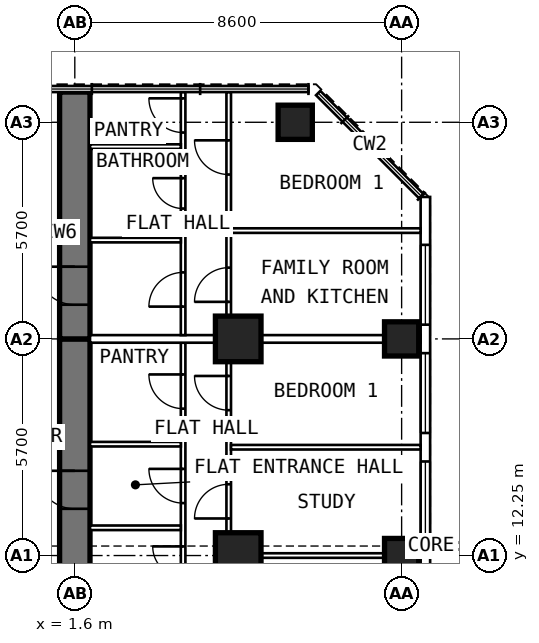
"""IFC4 building model, lengths in metres.
Left out: names, types, materials, properties, quantities, classifications, styles, units other than length and angle.
Written with IfcOpenShell. Run it as: python <this file> out.ifc"""

import sys

from ifc_helpers import new_model, si_unit, direction, frame, frame_2d, origin, origin_2d, place, context, subcontext, project, spatial, rectangle, extrude, element, fill, save


model = new_model("IFC4")
c1 = context("Model", 3, precision=1e-05, world=origin(), true_north=direction((0.0, 1.0)))
c2 = subcontext(c1, "Body", "Model", "MODEL_VIEW")
j1 = project(units=[si_unit("LENGTHUNIT", "METRE"), si_unit("PLANEANGLEUNIT", "RADIAN")], contexts=[c1])
p1 = place(None, origin())
s1 = spatial("IfcSite", under=j1, at=p1, CompositionType="ELEMENT")
p2 = place(p1, origin())
s2 = spatial("IfcBuilding", under=s1, at=p2, CompositionType="ELEMENT")
p3 = place(p2, frame((0.0, 0.0, 179.6)))
s3 = spatial("IfcBuildingStorey", under=s2, at=p3, CompositionType="ELEMENT", Elevation=179.6)
for number, where, z_axis, x_axis in (
    (1, (10.2, 12.25, 0.0), (0.0, 0.0, 1.0), (0.0, 1.0, 0.0)),
    (2, (10.2, 17.95, 0.0), (0.0, 0.0, 1.0), (0.0, 1.0, 0.0)),
    (3, (7.4, 23.65, 0.0), (0.0, 0.0, 1.0), (0.0, 1.0, 0.0)),
):
    element("IfcColumn", number, at=place(p3, frame(where, z_axis=z_axis, x_axis=x_axis)), inside=s3, PredefinedType="COLUMN", context=c2, shape_type="SweptSolid", body=[
        extrude(rectangle(XDim=0.9, YDim=0.9, at=origin_2d()), origin(), (0.0, 0.0, 1.0), 3.6),
    ])
for number, where, z_axis, x_axis in (
    (4, (5.9, 12.25, 0.0), (0.0, 0.0, 1.0), (0.0, 1.0, 0.0)),
    (5, (5.9, 17.95, 0.0), (0.0, 0.0, 1.0), (0.0, 1.0, 0.0)),
):
    element("IfcColumn", number, at=place(p3, frame(where, z_axis=z_axis, x_axis=x_axis)), inside=s3, PredefinedType="COLUMN", context=c2, shape_type="SweptSolid", body=[
        extrude(rectangle(XDim=1.2, YDim=1.2, at=origin_2d()), origin(), (0.0, 0.0, 1.0), 3.6),
    ])
p4 = place(p3, frame((1.6, 9.6, 0.0), z_axis=(0.0, 0.0, 1.0), x_axis=(0.0, 1.0, 0.0)))
e6 = element("IfcWall", 6, at=p4, inside=s3, PredefinedType="SHEAR", context=c2, shape_type="SweptSolid", body=[
    extrude(rectangle(XDim=8.35, YDim=0.8, at=frame_2d((4.175, 0.0))), origin(), (0.0, 0.0, 1.0), 3.6),
])
p5 = place(p4, frame((3.88, 0.0, 0.0)))
e7 = element("IfcOpeningElement", 7, at=p5, cuts=e6, PredefinedType="OPENING", context=c2, shape_type="SweptSolid", body=[
    extrude(rectangle(XDim=1.0, YDim=2.1, at=frame_2d((0.5, 1.05))), frame((0.0, 0.412, 0.0), z_axis=(0.0, -1.0, 0.0), x_axis=(1.0, 0.0, 0.0)), (0.0, 0.0, 1.0), 0.824),
])
p6 = place(p3, frame((1.6, 17.95, 0.0), z_axis=(0.0, 0.0, 1.0), x_axis=(0.0, 1.0, 0.0)))
e8 = element("IfcWall", 8, at=p6, inside=s3, PredefinedType="SHEAR", context=c2, shape_type="SweptSolid", body=[
    extrude(rectangle(XDim=6.495, YDim=0.8, at=frame_2d((3.248, 0.0))), origin(), (0.0, 0.0, 1.0), 3.6),
])
p7 = place(p6, frame((0.9, 0.0, 0.0)))
e9 = element("IfcOpeningElement", 9, at=p7, cuts=e8, PredefinedType="OPENING", context=c2, shape_type="SweptSolid", body=[
    extrude(rectangle(XDim=1.0, YDim=2.1, at=frame_2d((0.5, 1.05))), frame((0.0, 0.412, 0.0), z_axis=(0.0, -1.0, 0.0), x_axis=(1.0, 0.0, 0.0)), (0.0, 0.0, 1.0), 0.824),
])
p8 = place(p3, frame((10.825, 6.409, 0.0), z_axis=(0.0, 0.0, 1.0), x_axis=(0.0, 1.0, 0.0)))
e10 = element("IfcWall", 10, at=p8, inside=s3, PredefinedType="SOLIDWALL", context=c2, shape_type="SweptSolid", body=[
    extrude(rectangle(XDim=15.276, YDim=0.25, at=frame_2d((7.638, 0.0))), origin(), (0.0, 0.0, 1.0), 3.35),
])
p9 = place(p8, frame((0.516, 0.0, 0.8)))
e11 = element("IfcOpeningElement", 11, at=p9, cuts=e10, PredefinedType="OPENING", context=c2, shape_type="SweptSolid", body=[
    extrude(rectangle(XDim=2.1, YDim=1.8, at=frame_2d((1.05, 0.9))), frame((0.0, 0.137, 0.0), z_axis=(0.0, -1.0, 0.0), x_axis=(1.0, 0.0, 0.0)), (0.0, 0.0, 1.0), 0.274),
])
p10 = place(p8, frame((3.366, 0.0, 0.8)))
e12 = element("IfcOpeningElement", 12, at=p10, cuts=e10, PredefinedType="OPENING", context=c2, shape_type="SweptSolid", body=[
    extrude(rectangle(XDim=2.1, YDim=1.8, at=frame_2d((1.05, 0.9))), frame((0.0, 0.137, 0.0), z_axis=(0.0, -1.0, 0.0), x_axis=(1.0, 0.0, 0.0)), (0.0, 0.0, 1.0), 0.274),
])
p11 = place(p8, frame((6.216, 0.0, 0.8)))
e13 = element("IfcOpeningElement", 13, at=p11, cuts=e10, PredefinedType="OPENING", context=c2, shape_type="SweptSolid", body=[
    extrude(rectangle(XDim=2.1, YDim=1.8, at=frame_2d((1.05, 0.9))), frame((0.0, 0.137, 0.0), z_axis=(0.0, -1.0, 0.0), x_axis=(1.0, 0.0, 0.0)), (0.0, 0.0, 1.0), 0.274),
])
p12 = place(p8, frame((9.066, 0.0, 0.8)))
e14 = element("IfcOpeningElement", 14, at=p12, cuts=e10, PredefinedType="OPENING", context=c2, shape_type="SweptSolid", body=[
    extrude(rectangle(XDim=2.1, YDim=1.8, at=frame_2d((1.05, 0.9))), frame((0.0, 0.137, 0.0), z_axis=(0.0, -1.0, 0.0), x_axis=(1.0, 0.0, 0.0)), (0.0, 0.0, 1.0), 0.274),
])
p13 = place(p8, frame((11.916, 0.0, 0.8)))
e15 = element("IfcOpeningElement", 15, at=p13, cuts=e10, PredefinedType="OPENING", context=c2, shape_type="SweptSolid", body=[
    extrude(rectangle(XDim=2.1, YDim=1.8, at=frame_2d((1.05, 0.9))), frame((0.0, 0.137, 0.0), z_axis=(0.0, -1.0, 0.0), x_axis=(1.0, 0.0, 0.0)), (0.0, 0.0, 1.0), 0.274),
])
p14 = place(p3, frame((4.45, 10.05, 0.0), z_axis=(0.0, 0.0, 1.0), x_axis=(0.0, 1.0, 0.0)))
e16 = element("IfcWall", 16, at=p14, inside=s3, PredefinedType="PARTITIONING", context=c2, shape_type="SweptSolid", body=[
    extrude(rectangle(XDim=7.8, YDim=0.12, at=frame_2d((3.9, 0.0))), origin(), (0.0, 0.0, 1.0), 3.35),
])
p15 = place(p14, frame((1.64, 0.0, 0.0)))
e17 = element("IfcOpeningElement", 17, at=p15, cuts=e16, PredefinedType="OPENING", context=c2, shape_type="SweptSolid", body=[
    extrude(rectangle(XDim=0.8, YDim=2.1, at=frame_2d((0.4, 1.05))), frame((0.0, 0.072, 0.0), z_axis=(0.0, -1.0, 0.0), x_axis=(1.0, 0.0, 0.0)), (0.0, 0.0, 1.0), 0.144),
])
p16 = place(p14, frame((3.58, 0.0, 0.0)))
e18 = element("IfcOpeningElement", 18, at=p16, cuts=e16, PredefinedType="OPENING", context=c2, shape_type="SweptSolid", body=[
    extrude(rectangle(XDim=0.9, YDim=2.1, at=frame_2d((0.45, 1.05))), frame((0.0, 0.072, 0.0), z_axis=(0.0, -1.0, 0.0), x_axis=(1.0, 0.0, 0.0)), (0.0, 0.0, 1.0), 0.144),
])
p17 = place(p14, frame((6.065, 0.0, 0.0)))
e19 = element("IfcOpeningElement", 19, at=p17, cuts=e16, PredefinedType="OPENING", context=c2, shape_type="SweptSolid", body=[
    extrude(rectangle(XDim=0.9, YDim=2.1, at=frame_2d((0.45, 1.05))), frame((0.0, 0.072, 0.0), z_axis=(0.0, -1.0, 0.0), x_axis=(1.0, 0.0, 0.0)), (0.0, 0.0, 1.0), 0.144),
])
p18 = place(p3, frame((5.65, 9.6, 0.0), z_axis=(0.0, 0.0, 1.0), x_axis=(0.0, 1.0, 0.0)))
e20 = element("IfcWall", 20, at=p18, inside=s3, PredefinedType="PARTITIONING", context=c2, shape_type="SweptSolid", body=[
    extrude(rectangle(XDim=8.1, YDim=0.12, at=frame_2d((4.05, 0.0))), origin(), (0.0, 0.0, 1.0), 3.35),
])
p19 = place(p18, frame((1.0, 0.0, 0.0)))
e21 = element("IfcOpeningElement", 21, at=p19, cuts=e20, PredefinedType="OPENING", context=c2, shape_type="SweptSolid", body=[
    extrude(rectangle(XDim=0.9, YDim=2.1, at=frame_2d((0.45, 1.05))), frame((0.0, 0.072, 0.0), z_axis=(0.0, -1.0, 0.0), x_axis=(1.0, 0.0, 0.0)), (0.0, 0.0, 1.0), 0.144),
])
p20 = place(p18, frame((3.625, 0.0, 0.0)))
e22 = element("IfcOpeningElement", 22, at=p20, cuts=e20, PredefinedType="OPENING", context=c2, shape_type="SweptSolid", body=[
    extrude(rectangle(XDim=0.9, YDim=2.1, at=frame_2d((0.45, 1.05))), frame((0.0, 0.072, 0.0), z_axis=(0.0, -1.0, 0.0), x_axis=(1.0, 0.0, 0.0)), (0.0, 0.0, 1.0), 0.144),
])
p21 = place(p18, frame((6.475, 0.0, 0.0)))
e23 = element("IfcOpeningElement", 23, at=p21, cuts=e20, PredefinedType="OPENING", context=c2, shape_type="SweptSolid", body=[
    extrude(rectangle(XDim=0.9, YDim=2.1, at=frame_2d((0.45, 1.05))), frame((0.0, 0.072, 0.0), z_axis=(0.0, -1.0, 0.0), x_axis=(1.0, 0.0, 0.0)), (0.0, 0.0, 1.0), 0.144),
])
p22 = place(p3, frame((5.71, 12.25, 0.0), z_axis=(0.0, 0.0, 1.0), x_axis=(1.0, 0.0, 0.0)))
e24 = element("IfcWall", 24, at=p22, inside=s3, PredefinedType="PARTITIONING", context=c2, shape_type="SweptSolid", body=[
    extrude(rectangle(XDim=4.99, YDim=0.12, at=frame_2d((2.495, 0.0))), origin(), (0.0, 0.0, 1.0), 2.45),
])
p23 = place(p3, frame((5.71, 15.1, 0.0), z_axis=(0.0, 0.0, 1.0), x_axis=(1.0, 0.0, 0.0)))
e25 = element("IfcWall", 25, at=p23, inside=s3, PredefinedType="PARTITIONING", context=c2, shape_type="SweptSolid", body=[
    extrude(rectangle(XDim=4.99, YDim=0.12, at=frame_2d((2.495, 0.0))), origin(), (0.0, 0.0, 1.0), 3.35),
])
for number, where, z_axis, x_axis in (
    (26, (2.0, 12.98, 0.0), (0.0, 0.0, 1.0), (1.0, 0.0, 0.0)),
    (27, (2.0, 15.18, 0.0), (0.0, 0.0, 1.0), (1.0, 0.0, 0.0)),
):
    element("IfcWall", number, at=place(p3, frame(where, z_axis=z_axis, x_axis=x_axis)), inside=s3, PredefinedType="PARTITIONING", context=c2, shape_type="SweptSolid", body=[
        extrude(rectangle(XDim=2.39, YDim=0.12, at=frame_2d((1.195, 0.0))), origin(), (0.0, 0.0, 1.0), 3.35),
    ])
p24 = place(p3, frame((4.45, 18.05, 0.0), z_axis=(0.0, 0.0, 1.0), x_axis=(0.0, 1.0, 0.0)))
e28 = element("IfcWall", 28, at=p24, inside=s3, PredefinedType="PARTITIONING", context=c2, shape_type="SweptSolid", body=[
    extrude(rectangle(XDim=6.395, YDim=0.12, at=frame_2d((3.198, 0.0))), origin(), (0.0, 0.0, 1.0), 3.35),
])
p25 = place(p24, frame((0.75, 0.0, 0.0)))
e29 = element("IfcOpeningElement", 29, at=p25, cuts=e28, PredefinedType="OPENING", context=c2, shape_type="SweptSolid", body=[
    extrude(rectangle(XDim=0.9, YDim=2.1, at=frame_2d((0.45, 1.05))), frame((0.0, 0.072, 0.0), z_axis=(0.0, -1.0, 0.0), x_axis=(1.0, 0.0, 0.0)), (0.0, 0.0, 1.0), 0.144),
])
p26 = place(p24, frame((3.33, 0.0, 0.0)))
e30 = element("IfcOpeningElement", 30, at=p26, cuts=e28, PredefinedType="OPENING", context=c2, shape_type="SweptSolid", body=[
    extrude(rectangle(XDim=0.8, YDim=2.1, at=frame_2d((0.4, 1.05))), frame((0.0, 0.072, 0.0), z_axis=(0.0, -1.0, 0.0), x_axis=(1.0, 0.0, 0.0)), (0.0, 0.0, 1.0), 0.144),
])
p27 = place(p24, frame((5.33, 0.0, 0.0)))
e31 = element("IfcOpeningElement", 31, at=p27, cuts=e28, PredefinedType="OPENING", context=c2, shape_type="SweptSolid", body=[
    extrude(rectangle(XDim=0.9, YDim=2.1, at=frame_2d((0.45, 1.05))), frame((0.0, 0.072, 0.0), z_axis=(0.0, -1.0, 0.0), x_axis=(1.0, 0.0, 0.0)), (0.0, 0.0, 1.0), 0.144),
])
p28 = place(p3, frame((5.65, 18.05, 0.0), z_axis=(0.0, 0.0, 1.0), x_axis=(0.0, 1.0, 0.0)))
e32 = element("IfcWall", 32, at=p28, inside=s3, PredefinedType="PARTITIONING", context=c2, shape_type="SweptSolid", body=[
    extrude(rectangle(XDim=6.395, YDim=0.12, at=frame_2d((3.198, 0.0))), origin(), (0.0, 0.0, 1.0), 3.35),
])
p29 = place(p28, frame((0.875, 0.0, 0.0)))
e33 = element("IfcOpeningElement", 33, at=p29, cuts=e32, PredefinedType="OPENING", context=c2, shape_type="SweptSolid", body=[
    extrude(rectangle(XDim=0.9, YDim=2.1, at=frame_2d((0.45, 1.05))), frame((0.0, 0.072, 0.0), z_axis=(0.0, -1.0, 0.0), x_axis=(1.0, 0.0, 0.0)), (0.0, 0.0, 1.0), 0.144),
])
p30 = place(p28, frame((4.225, 0.0, 0.0)))
e34 = element("IfcOpeningElement", 34, at=p30, cuts=e32, PredefinedType="OPENING", context=c2, shape_type="SweptSolid", body=[
    extrude(rectangle(XDim=0.9, YDim=2.1, at=frame_2d((0.45, 1.05))), frame((0.0, 0.072, 0.0), z_axis=(0.0, -1.0, 0.0), x_axis=(1.0, 0.0, 0.0)), (0.0, 0.0, 1.0), 0.144),
])
p31 = place(p3, frame((5.71, 20.8, 0.0), z_axis=(0.0, 0.0, 1.0), x_axis=(1.0, 0.0, 0.0)))
e35 = element("IfcWall", 35, at=p31, inside=s3, PredefinedType="PARTITIONING", context=c2, shape_type="SweptSolid", body=[
    extrude(rectangle(XDim=4.99, YDim=0.12, at=frame_2d((2.495, 0.0))), origin(), (0.0, 0.0, 1.0), 3.35),
])
for number, where, z_axis, x_axis in (
    (36, (2.0, 20.55, 0.0), (0.0, 0.0, 1.0), (1.0, 0.0, 0.0)),
    (37, (2.0, 23.01, 0.0), (0.0, 0.0, 1.0), (1.0, 0.0, 0.0)),
):
    element("IfcWall", number, at=place(p3, frame(where, z_axis=z_axis, x_axis=x_axis)), inside=s3, PredefinedType="PARTITIONING", context=c2, shape_type="SweptSolid", body=[
        extrude(rectangle(XDim=2.39, YDim=0.12, at=frame_2d((1.195, 0.0))), origin(), (0.0, 0.0, 1.0), 3.35),
    ])
p32 = place(p3, frame((2.0, 17.95, 0.0), z_axis=(0.0, 0.0, 1.0), x_axis=(1.0, 0.0, 0.0)))
e38 = element("IfcWall", 38, at=p32, inside=s3, PredefinedType="PARTITIONING", context=c2, shape_type="SweptSolid", body=[
    extrude(rectangle(XDim=8.7, YDim=0.2, at=frame_2d((4.35, 0.0))), origin(), (0.0, 0.0, 1.0), 2.45),
])
p33 = place(p3, frame((1.2, 20.75, 0.0), z_axis=(0.0, 0.0, 1.0), x_axis=(-1.0, 0.0, 0.0)))
e39 = element("IfcWall", 39, at=p33, inside=s3, PredefinedType="PARTITIONING", context=c2, shape_type="SweptSolid", body=[
    extrude(rectangle(XDim=2.4, YDim=0.15, at=frame_2d((1.2, 0.0))), origin(), (0.0, 0.0, 1.0), 3.35),
])
p34 = place(p33, frame((0.7, 0.0, 0.0)))
e40 = element("IfcOpeningElement", 40, at=p34, cuts=e39, PredefinedType="OPENING", context=c2, shape_type="SweptSolid", body=[
    extrude(rectangle(XDim=1.0, YDim=2.1, at=frame_2d((0.5, 1.05))), frame((0.0, 0.087, 0.0), z_axis=(0.0, -1.0, 0.0), x_axis=(1.0, 0.0, 0.0)), (0.0, 0.0, 1.0), 0.174),
])
p35 = place(p11, origin())
e41 = element("IfcWindow", 41, at=p35, inside=s3, PartitioningType="SINGLE_PANEL", PredefinedType="WINDOW", context=c2, shape_type="SweptSolid", body=[
    extrude(rectangle(XDim=2.1, YDim=1.8, at=frame_2d((1.05, 0.9))), frame((0.0, 0.03, 0.0), z_axis=(0.0, -1.0, 0.0), x_axis=(1.0, 0.0, 0.0)), (0.0, 0.0, 1.0), 0.06),
])
fill(e13, e41)
p36 = place(p12, origin())
e42 = element("IfcWindow", 42, at=p36, inside=s3, PartitioningType="SINGLE_PANEL", PredefinedType="WINDOW", context=c2, shape_type="SweptSolid", body=[
    extrude(rectangle(XDim=2.1, YDim=1.8, at=frame_2d((1.05, 0.9))), frame((0.0, 0.03, 0.0), z_axis=(0.0, -1.0, 0.0), x_axis=(1.0, 0.0, 0.0)), (0.0, 0.0, 1.0), 0.06),
])
fill(e14, e42)
p37 = place(p13, origin())
e43 = element("IfcWindow", 43, at=p37, inside=s3, PartitioningType="SINGLE_PANEL", PredefinedType="WINDOW", context=c2, shape_type="SweptSolid", body=[
    extrude(rectangle(XDim=2.1, YDim=1.8, at=frame_2d((1.05, 0.9))), frame((0.0, 0.03, 0.0), z_axis=(0.0, -1.0, 0.0), x_axis=(1.0, 0.0, 0.0)), (0.0, 0.0, 1.0), 0.06),
])
fill(e15, e43)
p38 = place(p5, origin())
e44 = element("IfcDoor", 44, at=p38, inside=s3, OperationType="SINGLE_SWING_RIGHT", PredefinedType="DOOR", context=c2, shape_type="SweptSolid", body=[
    extrude(rectangle(XDim=1.0, YDim=2.1, at=frame_2d((0.5, 1.05))), frame((0.0, 0.15, 0.0), z_axis=(0.0, -1.0, 0.0), x_axis=(1.0, 0.0, 0.0)), (0.0, 0.0, 1.0), 0.3),
])
fill(e7, e44)
p39 = place(p20, origin())
e45 = element("IfcDoor", 45, at=p39, inside=s3, OperationType="SINGLE_SWING_LEFT", PredefinedType="DOOR", context=c2, shape_type="SweptSolid", body=[
    extrude(rectangle(XDim=0.9, YDim=2.1, at=frame_2d((0.45, 1.05))), frame((0.0, 0.025, 0.0), z_axis=(0.0, -1.0, 0.0), x_axis=(1.0, 0.0, 0.0)), (0.0, 0.0, 1.0), 0.05),
])
fill(e22, e45)
p40 = place(p21, origin())
e46 = element("IfcDoor", 46, at=p40, inside=s3, OperationType="SINGLE_SWING_RIGHT", PredefinedType="DOOR", context=c2, shape_type="SweptSolid", body=[
    extrude(rectangle(XDim=0.9, YDim=2.1, at=frame_2d((0.45, 1.05))), frame((0.0, 0.025, 0.0), z_axis=(0.0, -1.0, 0.0), x_axis=(1.0, 0.0, 0.0)), (0.0, 0.0, 1.0), 0.05),
])
fill(e23, e46)
p41 = place(p15, origin())
e47 = element("IfcDoor", 47, at=p41, inside=s3, OperationType="SINGLE_SWING_RIGHT", PredefinedType="DOOR", context=c2, shape_type="SweptSolid", body=[
    extrude(rectangle(XDim=0.8, YDim=2.1, at=frame_2d((0.4, 1.05))), frame((0.0, 0.025, 0.0), z_axis=(0.0, -1.0, 0.0), x_axis=(1.0, 0.0, 0.0)), (0.0, 0.0, 1.0), 0.05),
])
fill(e17, e47)
p42 = place(p16, origin())
e48 = element("IfcDoor", 48, at=p42, inside=s3, OperationType="SINGLE_SWING_RIGHT", PredefinedType="DOOR", context=c2, shape_type="SweptSolid", body=[
    extrude(rectangle(XDim=0.9, YDim=2.1, at=frame_2d((0.45, 1.05))), frame((0.0, 0.025, 0.0), z_axis=(0.0, -1.0, 0.0), x_axis=(1.0, 0.0, 0.0)), (0.0, 0.0, 1.0), 0.05),
])
fill(e18, e48)
p43 = place(p17, origin())
e49 = element("IfcDoor", 49, at=p43, inside=s3, OperationType="SINGLE_SWING_RIGHT", PredefinedType="DOOR", context=c2, shape_type="SweptSolid", body=[
    extrude(rectangle(XDim=0.9, YDim=2.1, at=frame_2d((0.45, 1.05))), frame((0.0, 0.025, 0.0), z_axis=(0.0, -1.0, 0.0), x_axis=(1.0, 0.0, 0.0)), (0.0, 0.0, 1.0), 0.05),
])
fill(e19, e49)
p44 = place(p7, origin())
e50 = element("IfcDoor", 50, at=p44, inside=s3, OperationType="SINGLE_SWING_RIGHT", PredefinedType="DOOR", context=c2, shape_type="SweptSolid", body=[
    extrude(rectangle(XDim=1.0, YDim=2.1, at=frame_2d((0.5, 1.05))), frame((0.0, 0.15, 0.0), z_axis=(0.0, -1.0, 0.0), x_axis=(1.0, 0.0, 0.0)), (0.0, 0.0, 1.0), 0.3),
])
fill(e9, e50)
p45 = place(p29, origin())
e51 = element("IfcDoor", 51, at=p45, inside=s3, OperationType="SINGLE_SWING_LEFT", PredefinedType="DOOR", context=c2, shape_type="SweptSolid", body=[
    extrude(rectangle(XDim=0.9, YDim=2.1, at=frame_2d((0.45, 1.05))), frame((0.0, 0.025, 0.0), z_axis=(0.0, -1.0, 0.0), x_axis=(1.0, 0.0, 0.0)), (0.0, 0.0, 1.0), 0.05),
])
fill(e33, e51)
p46 = place(p30, origin())
e52 = element("IfcDoor", 52, at=p46, inside=s3, OperationType="SINGLE_SWING_RIGHT", PredefinedType="DOOR", context=c2, shape_type="SweptSolid", body=[
    extrude(rectangle(XDim=0.9, YDim=2.1, at=frame_2d((0.45, 1.05))), frame((0.0, 0.025, 0.0), z_axis=(0.0, -1.0, 0.0), x_axis=(1.0, 0.0, 0.0)), (0.0, 0.0, 1.0), 0.05),
])
fill(e34, e52)
p47 = place(p25, origin())
e53 = element("IfcDoor", 53, at=p47, inside=s3, OperationType="SINGLE_SWING_LEFT", PredefinedType="DOOR", context=c2, shape_type="SweptSolid", body=[
    extrude(rectangle(XDim=0.9, YDim=2.1, at=frame_2d((0.45, 1.05))), frame((0.0, 0.025, 0.0), z_axis=(0.0, -1.0, 0.0), x_axis=(1.0, 0.0, 0.0)), (0.0, 0.0, 1.0), 0.05),
])
fill(e29, e53)
p48 = place(p26, origin())
e54 = element("IfcDoor", 54, at=p48, inside=s3, OperationType="SINGLE_SWING_RIGHT", PredefinedType="DOOR", context=c2, shape_type="SweptSolid", body=[
    extrude(rectangle(XDim=0.8, YDim=2.1, at=frame_2d((0.4, 1.05))), frame((0.0, 0.025, 0.0), z_axis=(0.0, -1.0, 0.0), x_axis=(1.0, 0.0, 0.0)), (0.0, 0.0, 1.0), 0.05),
])
fill(e30, e54)
p49 = place(p27, origin())
e55 = element("IfcDoor", 55, at=p49, inside=s3, OperationType="SINGLE_SWING_RIGHT", PredefinedType="DOOR", context=c2, shape_type="SweptSolid", body=[
    extrude(rectangle(XDim=0.9, YDim=2.1, at=frame_2d((0.45, 1.05))), frame((0.0, 0.025, 0.0), z_axis=(0.0, -1.0, 0.0), x_axis=(1.0, 0.0, 0.0)), (0.0, 0.0, 1.0), 0.05),
])
fill(e31, e55)
save(model, sys.argv[1])
